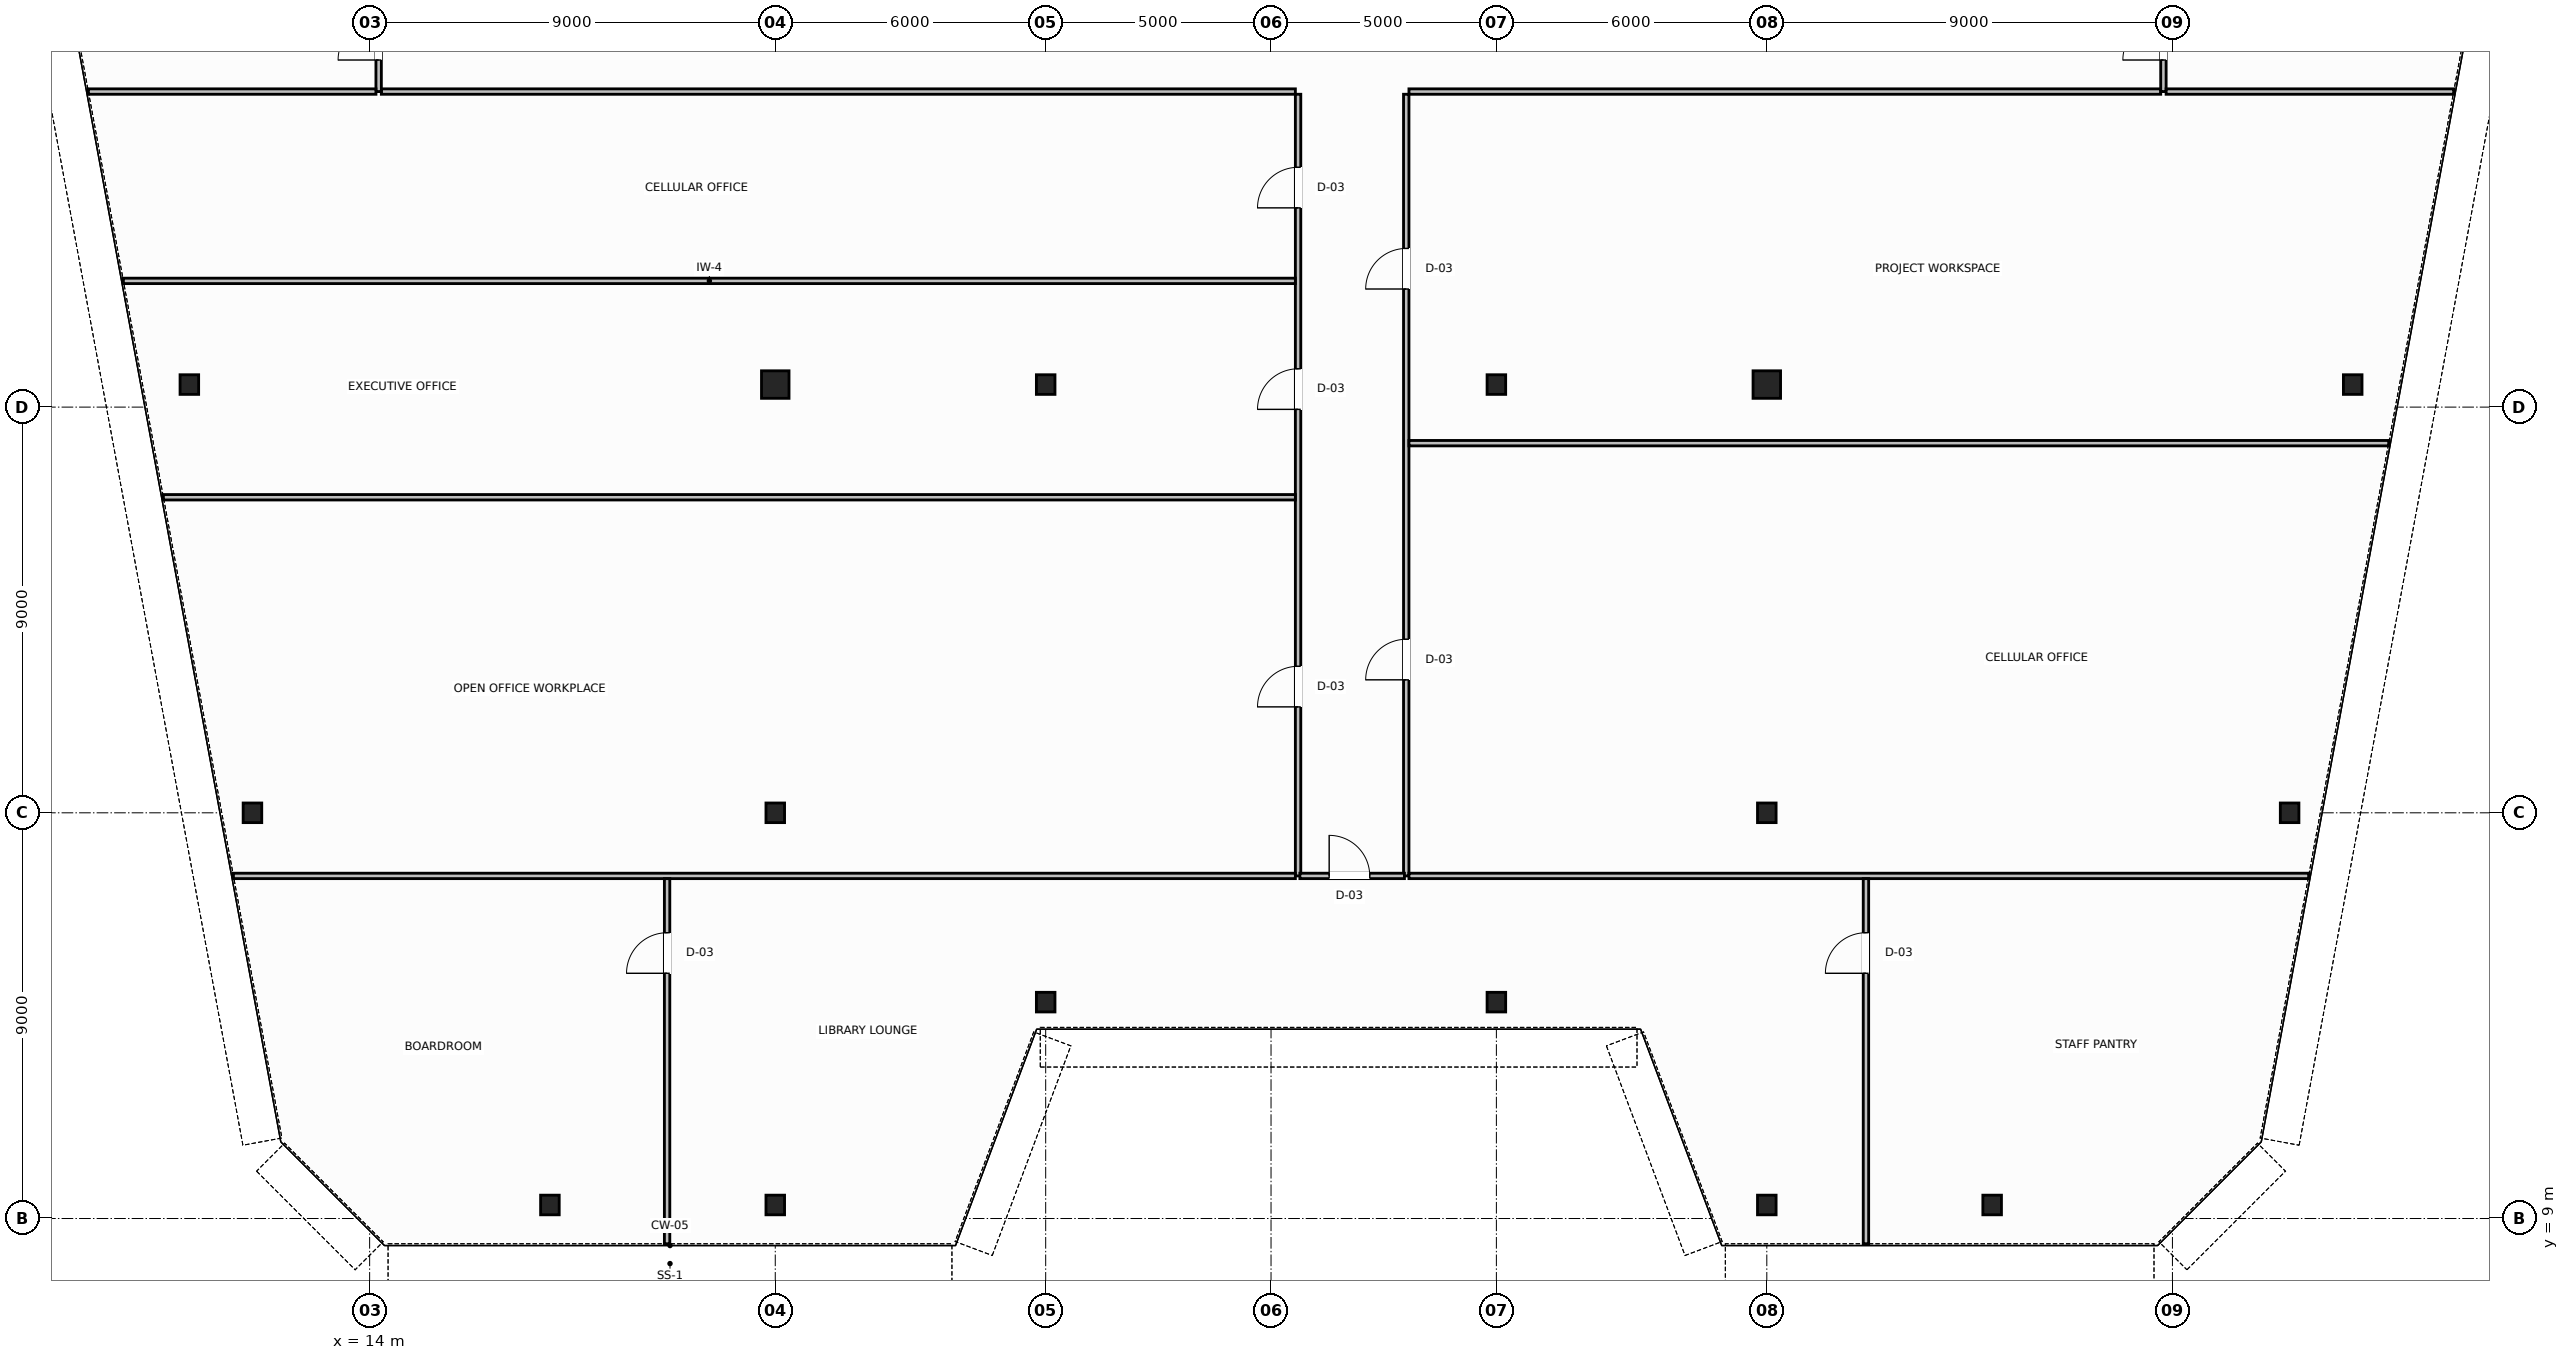
"""IFC4 building model, lengths in metres.
Left out: names, types, materials, properties, quantities, classifications, styles, units other than length and angle.
Written with IfcOpenShell. Run it as: python <this file> out.ifc"""

import sys

from ifc_helpers import new_model, si_unit, direction, frame, frame_2d, origin, origin_2d, place, context, subcontext, project, spatial, rectangle, hollow_circle, i_section, extrude, source, transform, mapped, element, fill, save


model = new_model("IFC4")
c1 = context("Model", 3, precision=1e-05, world=origin(), true_north=direction((0.0, 1.0)))
c2 = subcontext(c1, "Body", "Model", "MODEL_VIEW")
j1 = project(units=[si_unit("LENGTHUNIT", "METRE"), si_unit("PLANEANGLEUNIT", "RADIAN")], contexts=[c1])
p1 = place(None, origin())
s1 = spatial("IfcSite", under=j1, at=p1, CompositionType="ELEMENT")
p2 = place(p1, origin())
s2 = spatial("IfcBuilding", under=s1, at=p2, CompositionType="ELEMENT")
p3 = place(p2, frame((0.0, 0.0, 230.8)))
s3 = spatial("IfcBuildingStorey", under=s2, at=p3, CompositionType="ELEMENT", Elevation=230.8)
m1 = source(origin(), c2, "Body", "SweptSolid", [
    extrude(i_section(OverallWidth=0.412, OverallDepth=0.435, WebThickness=0.036, FlangeThickness=0.05, FilletRadius=0.015, at=origin_2d()), origin(), (0.0, 0.0, 1.0), 3.8),
])
for number, where, z_axis, x_axis in (
    (1, (10.0, 27.5, 0.0), (0.0, 0.0, 1.0), (1.0, 0.0, 0.0)),
    (2, (11.4, 18.0, 0.0), (0.0, 0.0, 1.0), (1.0, 0.0, 0.0)),
    (3, (58.0, 27.5, 0.0), (0.0, 0.0, 1.0), (1.0, 0.0, 0.0)),
    (4, (56.6, 18.0, 0.0), (0.0, 0.0, 1.0), (1.0, 0.0, 0.0)),
):
    element("IfcColumn", number, at=place(p3, frame(where, z_axis=z_axis, x_axis=x_axis)), inside=s3, PredefinedType="COLUMN", context=c2, shape_type="MappedRepresentation", body=[
        mapped(m1, transform((0.0, 0.0, 0.0), scale=1.0)),
    ])
m2 = source(origin(), c2, "Body", "SweptSolid", [
    extrude(hollow_circle(Radius=0.305, WallThickness=0.03, at=origin_2d()), origin(), (0.0, 0.0, 1.0), 3.8),
])
p4 = place(p3, frame((23.0, 27.5, 0.0), z_axis=(0.0, 0.0, 1.0), x_axis=(1.0, 0.0, 0.0)))
e5 = element("IfcColumn", 5, at=p4, inside=s3, PredefinedType="COLUMN", context=c2, shape_type="MappedRepresentation", body=[
    mapped(m2, transform((0.0, 0.0, 0.0), scale=1.0)),
])
m3 = source(origin(), c2, "Body", "SweptSolid", [
    extrude(i_section(OverallWidth=0.412, OverallDepth=0.435, WebThickness=0.036, FlangeThickness=0.05, FilletRadius=0.015, at=origin_2d()), origin(), (0.0, 0.0, 1.0), 3.8),
])
for number, where, z_axis, x_axis in (
    (6, (29.0, 27.5, 0.0), (0.0, 0.0, 1.0), (1.0, 0.0, 0.0)),
    (7, (39.0, 27.5, 0.0), (0.0, 0.0, 1.0), (1.0, 0.0, 0.0)),
):
    element("IfcColumn", number, at=place(p3, frame(where, z_axis=z_axis, x_axis=x_axis)), inside=s3, PredefinedType="COLUMN", context=c2, shape_type="MappedRepresentation", body=[
        mapped(m3, transform((0.0, 0.0, 0.0), scale=1.0)),
    ])
p5 = place(p3, frame((45.0, 27.5, 0.0), z_axis=(0.0, 0.0, 1.0), x_axis=(1.0, 0.0, 0.0)))
e8 = element("IfcColumn", 8, at=p5, inside=s3, PredefinedType="COLUMN", context=c2, shape_type="MappedRepresentation", body=[
    mapped(m2, transform((0.0, 0.0, 0.0), scale=1.0)),
])
for number, where, z_axis, x_axis in (
    (9, (23.0, 18.0, 0.0), (0.0, 0.0, 1.0), (1.0, 0.0, 0.0)),
    (10, (45.0, 18.0, 0.0), (0.0, 0.0, 1.0), (1.0, 0.0, 0.0)),
    (11, (18.0, 9.3, 0.0), (0.0, 0.0, 1.0), (1.0, 0.0, 0.0)),
    (12, (23.0, 9.3, 0.0), (0.0, 0.0, 1.0), (1.0, 0.0, 0.0)),
    (13, (29.0, 13.8, 0.0), (0.0, 0.0, 1.0), (1.0, 0.0, 0.0)),
    (14, (39.0, 13.8, 0.0), (0.0, 0.0, 1.0), (1.0, 0.0, 0.0)),
    (15, (45.0, 9.3, 0.0), (0.0, 0.0, 1.0), (1.0, 0.0, 0.0)),
    (16, (50.0, 9.3, 0.0), (0.0, 0.0, 1.0), (1.0, 0.0, 0.0)),
):
    element("IfcColumn", number, at=place(p3, frame(where, z_axis=z_axis, x_axis=x_axis)), inside=s3, PredefinedType="COLUMN", context=c2, shape_type="MappedRepresentation", body=[
        mapped(m3, transform((0.0, 0.0, 0.0), scale=1.0)),
    ])
p6 = place(p3, frame((14.26, 34.0, 0.0), z_axis=(0.0, 0.0, 1.0), x_axis=(1.0, 0.0, 0.0)))
e17 = element("IfcWall", 17, at=p6, inside=s3, PredefinedType="PARTITIONING", context=c2, shape_type="SweptSolid", body=[
    extrude(rectangle(XDim=20.28, YDim=0.12, at=frame_2d((10.14, 0.0))), origin(), (0.0, 0.0, 1.0), 3.58),
])
p7 = place(p3, frame((37.06, 34.0, 0.0), z_axis=(0.0, 0.0, 1.0), x_axis=(1.0, 0.0, 0.0)))
e18 = element("IfcWall", 18, at=p7, inside=s3, PredefinedType="PARTITIONING", context=c2, shape_type="SweptSolid", body=[
    extrude(rectangle(XDim=16.68, YDim=0.12, at=frame_2d((8.34, 0.0))), origin(), (0.0, 0.0, 1.0), 3.58),
])
p8 = place(p3, frame((14.2, 34.0, 0.0), z_axis=(0.0, 0.0, 1.0), x_axis=(0.0, 1.0, 0.0)))
e19 = element("IfcWall", 19, at=p8, inside=s3, PredefinedType="PARTITIONING", context=c2, shape_type="SweptSolid", body=[
    extrude(rectangle(XDim=2.44, YDim=0.12, at=frame_2d((1.22, 0.0))), origin(), (0.0, 0.0, 1.0), 3.58),
])
p9 = place(p8, frame((0.7, 0.0, 0.0)))
e20 = element("IfcOpeningElement", 20, at=p9, cuts=e19, PredefinedType="OPENING", context=c2, shape_type="SweptSolid", body=[
    extrude(rectangle(XDim=0.9, YDim=2.15, at=frame_2d((0.45, 1.075))), frame((0.0, 0.07, 0.0), z_axis=(0.0, -1.0, 0.0), x_axis=(1.0, 0.0, 0.0)), (0.0, 0.0, 1.0), 0.14),
])
p10 = place(p3, frame((53.8, 34.0, 0.0), z_axis=(0.0, 0.0, 1.0), x_axis=(0.0, 1.0, 0.0)))
e21 = element("IfcWall", 21, at=p10, inside=s3, PredefinedType="PARTITIONING", context=c2, shape_type="SweptSolid", body=[
    extrude(rectangle(XDim=2.44, YDim=0.12, at=frame_2d((1.22, 0.0))), origin(), (0.0, 0.0, 1.0), 3.58),
])
p11 = place(p10, frame((0.7, 0.0, 0.0)))
e22 = element("IfcOpeningElement", 22, at=p11, cuts=e21, PredefinedType="OPENING", context=c2, shape_type="SweptSolid", body=[
    extrude(rectangle(XDim=0.9, YDim=2.15, at=frame_2d((0.45, 1.075))), frame((0.0, 0.07, 0.0), z_axis=(0.0, -1.0, 0.0), x_axis=(1.0, 0.0, 0.0)), (0.0, 0.0, 1.0), 0.14),
])
p12 = place(p3, frame((34.6, 16.6, 0.0), z_axis=(0.0, 0.0, 1.0), x_axis=(0.0, 1.0, 0.0)))
e23 = element("IfcWall", 23, at=p12, inside=s3, PredefinedType="PARTITIONING", context=c2, shape_type="SweptSolid", body=[
    extrude(rectangle(XDim=17.34, YDim=0.12, at=frame_2d((8.67, 0.0))), origin(), (0.0, 0.0, 1.0), 3.58),
])
p13 = place(p12, frame((3.75, 0.0, 0.0)))
e24 = element("IfcOpeningElement", 24, at=p13, cuts=e23, PredefinedType="OPENING", context=c2, shape_type="SweptSolid", body=[
    extrude(rectangle(XDim=0.9, YDim=2.15, at=frame_2d((0.45, 1.075))), frame((0.0, 0.07, 0.0), z_axis=(0.0, -1.0, 0.0), x_axis=(1.0, 0.0, 0.0)), (0.0, 0.0, 1.0), 0.14),
])
p14 = place(p12, frame((10.35, 0.0, 0.0)))
e25 = element("IfcOpeningElement", 25, at=p14, cuts=e23, PredefinedType="OPENING", context=c2, shape_type="SweptSolid", body=[
    extrude(rectangle(XDim=0.9, YDim=2.15, at=frame_2d((0.45, 1.075))), frame((0.0, 0.07, 0.0), z_axis=(0.0, -1.0, 0.0), x_axis=(1.0, 0.0, 0.0)), (0.0, 0.0, 1.0), 0.14),
])
p15 = place(p12, frame((14.82, 0.0, 0.0)))
e26 = element("IfcOpeningElement", 26, at=p15, cuts=e23, PredefinedType="OPENING", context=c2, shape_type="SweptSolid", body=[
    extrude(rectangle(XDim=0.9, YDim=2.15, at=frame_2d((0.45, 1.075))), frame((0.0, 0.07, 0.0), z_axis=(0.0, -1.0, 0.0), x_axis=(1.0, 0.0, 0.0)), (0.0, 0.0, 1.0), 0.14),
])
p16 = place(p3, frame((37.0, 16.6, 0.0), z_axis=(0.0, 0.0, 1.0), x_axis=(0.0, 1.0, 0.0)))
e27 = element("IfcWall", 27, at=p16, inside=s3, PredefinedType="PARTITIONING", context=c2, shape_type="SweptSolid", body=[
    extrude(rectangle(XDim=17.34, YDim=0.12, at=frame_2d((8.67, 0.0))), origin(), (0.0, 0.0, 1.0), 3.58),
])
p17 = place(p16, frame((4.35, 0.0, 0.0)))
e28 = element("IfcOpeningElement", 28, at=p17, cuts=e27, PredefinedType="OPENING", context=c2, shape_type="SweptSolid", body=[
    extrude(rectangle(XDim=0.9, YDim=2.15, at=frame_2d((0.45, 1.075))), frame((0.0, 0.07, 0.0), z_axis=(0.0, -1.0, 0.0), x_axis=(1.0, 0.0, 0.0)), (0.0, 0.0, 1.0), 0.14),
])
p18 = place(p16, frame((13.02, 0.0, 0.0)))
e29 = element("IfcOpeningElement", 29, at=p18, cuts=e27, PredefinedType="OPENING", context=c2, shape_type="SweptSolid", body=[
    extrude(rectangle(XDim=0.9, YDim=2.15, at=frame_2d((0.45, 1.075))), frame((0.0, 0.07, 0.0), z_axis=(0.0, -1.0, 0.0), x_axis=(1.0, 0.0, 0.0)), (0.0, 0.0, 1.0), 0.14),
])
p19 = place(p3, frame((34.64, 16.6, 0.0), z_axis=(0.0, 0.0, 1.0), x_axis=(1.0, 0.0, 0.0)))
e30 = element("IfcWall", 30, at=p19, inside=s3, PredefinedType="PARTITIONING", context=c2, shape_type="SweptSolid", body=[
    extrude(rectangle(XDim=2.32, YDim=0.12, at=frame_2d((1.16, 0.0))), origin(), (0.0, 0.0, 1.0), 3.58),
])
p20 = place(p19, frame((0.65, 0.0, 0.0)))
e31 = element("IfcOpeningElement", 31, at=p20, cuts=e30, PredefinedType="OPENING", context=c2, shape_type="SweptSolid", body=[
    extrude(rectangle(XDim=0.9, YDim=2.15, at=frame_2d((0.45, 1.075))), frame((0.0, 0.07, 0.0), z_axis=(0.0, -1.0, 0.0), x_axis=(1.0, 0.0, 0.0)), (0.0, 0.0, 1.0), 0.14),
])
for number, where, z_axis, x_axis in (
    (32, (7.759, 34.0, 0.0), (0.0, 0.0, 1.0), (1.0, 0.0, 0.0)),
    (33, (53.86, 34.0, 0.0), (0.0, 0.0, 1.0), (1.0, 0.0, 0.0)),
):
    element("IfcWall", number, at=place(p3, frame(where, z_axis=z_axis, x_axis=x_axis)), inside=s3, PredefinedType="PARTITIONING", context=c2, shape_type="SweptSolid", body=[
        extrude(rectangle(XDim=6.381, YDim=0.12, at=frame_2d((3.19, 0.0))), origin(), (0.0, 0.0, 1.0), 3.58),
    ])
p21 = place(p3, frame((9.424, 25.0, 0.0), z_axis=(0.0, 0.0, 1.0), x_axis=(1.0, 0.0, 0.0)))
e34 = element("IfcWall", 34, at=p21, inside=s3, PredefinedType="PARTITIONING", context=c2, shape_type="SweptSolid", body=[
    extrude(rectangle(XDim=25.116, YDim=0.12, at=frame_2d((12.558, 0.0))), origin(), (0.0, 0.0, 1.0), 3.58),
])
p22 = place(p3, frame((8.536, 29.8, 0.0), z_axis=(0.0, 0.0, 1.0), x_axis=(1.0, 0.0, 0.0)))
e35 = element("IfcWall", 35, at=p22, inside=s3, PredefinedType="PARTITIONING", context=c2, shape_type="SweptSolid", body=[
    extrude(rectangle(XDim=26.004, YDim=0.12, at=frame_2d((13.002, 0.0))), origin(), (0.0, 0.0, 1.0), 3.58),
])
p23 = place(p3, frame((37.06, 26.2, 0.0), z_axis=(0.0, 0.0, 1.0), x_axis=(1.0, 0.0, 0.0)))
e36 = element("IfcWall", 36, at=p23, inside=s3, PredefinedType="PARTITIONING", context=c2, shape_type="SweptSolid", body=[
    extrude(rectangle(XDim=21.738, YDim=0.12, at=frame_2d((10.869, 0.0))), origin(), (0.0, 0.0, 1.0), 3.58),
])
p24 = place(p3, frame((10.978, 16.6, 0.0), z_axis=(0.0, 0.0, 1.0), x_axis=(1.0, 0.0, 0.0)))
e37 = element("IfcWall", 37, at=p24, inside=s3, PredefinedType="PARTITIONING", context=c2, shape_type="SweptSolid", body=[
    extrude(rectangle(XDim=23.562, YDim=0.12, at=frame_2d((11.781, 0.0))), origin(), (0.0, 0.0, 1.0), 3.58),
])
p25 = place(p3, frame((37.06, 16.6, 0.0), z_axis=(0.0, 0.0, 1.0), x_axis=(1.0, 0.0, 0.0)))
e38 = element("IfcWall", 38, at=p25, inside=s3, PredefinedType="PARTITIONING", context=c2, shape_type="SweptSolid", body=[
    extrude(rectangle(XDim=19.962, YDim=0.12, at=frame_2d((9.981, 0.0))), origin(), (0.0, 0.0, 1.0), 3.58),
])
p26 = place(p3, frame((20.6, 8.44, 0.0), z_axis=(0.0, 0.0, 1.0), x_axis=(0.0, 1.0, 0.0)))
e39 = element("IfcWall", 39, at=p26, inside=s3, PredefinedType="PARTITIONING", context=c2, shape_type="SweptSolid", body=[
    extrude(rectangle(XDim=8.1, YDim=0.12, at=frame_2d((4.05, 0.0))), origin(), (0.0, 0.0, 1.0), 3.58),
])
p27 = place(p26, frame((6.0, 0.0, 0.0)))
e40 = element("IfcOpeningElement", 40, at=p27, cuts=e39, PredefinedType="OPENING", context=c2, shape_type="SweptSolid", body=[
    extrude(rectangle(XDim=0.9, YDim=2.15, at=frame_2d((0.45, 1.075))), frame((0.0, 0.07, 0.0), z_axis=(0.0, -1.0, 0.0), x_axis=(1.0, 0.0, 0.0)), (0.0, 0.0, 1.0), 0.14),
])
p28 = place(p3, frame((47.2, 8.44, 0.0), z_axis=(0.0, 0.0, 1.0), x_axis=(0.0, 1.0, 0.0)))
e41 = element("IfcWall", 41, at=p28, inside=s3, PredefinedType="PARTITIONING", context=c2, shape_type="SweptSolid", body=[
    extrude(rectangle(XDim=8.1, YDim=0.12, at=frame_2d((4.05, 0.0))), origin(), (0.0, 0.0, 1.0), 3.58),
])
p29 = place(p28, frame((6.0, 0.0, 0.0)))
e42 = element("IfcOpeningElement", 42, at=p29, cuts=e41, PredefinedType="OPENING", context=c2, shape_type="SweptSolid", body=[
    extrude(rectangle(XDim=0.9, YDim=2.15, at=frame_2d((0.45, 1.075))), frame((0.0, 0.07, 0.0), z_axis=(0.0, -1.0, 0.0), x_axis=(1.0, 0.0, 0.0)), (0.0, 0.0, 1.0), 0.14),
])
m4 = source(origin(), c2, "Body", "SweptSolid", [
    extrude(rectangle(XDim=0.9, YDim=2.15, at=frame_2d((0.45, 1.075))), frame((0.0, 0.025, 0.0), z_axis=(0.0, -1.0, 0.0), x_axis=(1.0, 0.0, 0.0)), (0.0, 0.0, 1.0), 0.05),
])
p30 = place(p9, origin())
e43 = element("IfcDoor", 43, at=p30, inside=s3, OperationType="SINGLE_SWING_LEFT", PredefinedType="DOOR", context=c2, shape_type="MappedRepresentation", body=[
    mapped(m4, transform((0.0, 0.0, 0.0), scale=1.0)),
])
fill(e20, e43)
p31 = place(p11, origin())
e44 = element("IfcDoor", 44, at=p31, inside=s3, OperationType="SINGLE_SWING_RIGHT", PredefinedType="DOOR", context=c2, shape_type="MappedRepresentation", body=[
    mapped(m4, transform((0.0, 0.0, 0.0), scale=1.0)),
])
fill(e22, e44)
p32 = place(p13, origin())
e45 = element("IfcDoor", 45, at=p32, inside=s3, OperationType="SINGLE_SWING_LEFT", PredefinedType="DOOR", context=c2, shape_type="MappedRepresentation", body=[
    mapped(m4, transform((0.0, 0.0, 0.0), scale=1.0)),
])
fill(e24, e45)
p33 = place(p14, origin())
e46 = element("IfcDoor", 46, at=p33, inside=s3, OperationType="SINGLE_SWING_RIGHT", PredefinedType="DOOR", context=c2, shape_type="MappedRepresentation", body=[
    mapped(m4, transform((0.0, 0.0, 0.0), scale=1.0)),
])
fill(e25, e46)
p34 = place(p15, origin())
e47 = element("IfcDoor", 47, at=p34, inside=s3, OperationType="SINGLE_SWING_LEFT", PredefinedType="DOOR", context=c2, shape_type="MappedRepresentation", body=[
    mapped(m4, transform((0.0, 0.0, 0.0), scale=1.0)),
])
fill(e26, e47)
p35 = place(p17, origin())
e48 = element("IfcDoor", 48, at=p35, inside=s3, OperationType="SINGLE_SWING_RIGHT", PredefinedType="DOOR", context=c2, shape_type="MappedRepresentation", body=[
    mapped(m4, transform((0.0, 0.0, 0.0), scale=1.0)),
])
fill(e28, e48)
p36 = place(p18, origin())
e49 = element("IfcDoor", 49, at=p36, inside=s3, OperationType="SINGLE_SWING_LEFT", PredefinedType="DOOR", context=c2, shape_type="MappedRepresentation", body=[
    mapped(m4, transform((0.0, 0.0, 0.0), scale=1.0)),
])
fill(e29, e49)
p37 = place(p27, origin())
e50 = element("IfcDoor", 50, at=p37, inside=s3, OperationType="SINGLE_SWING_RIGHT", PredefinedType="DOOR", context=c2, shape_type="MappedRepresentation", body=[
    mapped(m4, transform((0.0, 0.0, 0.0), scale=1.0)),
])
fill(e40, e50)
p38 = place(p20, origin())
e51 = element("IfcDoor", 51, at=p38, inside=s3, OperationType="SINGLE_SWING_LEFT", PredefinedType="DOOR", context=c2, shape_type="MappedRepresentation", body=[
    mapped(m4, transform((0.0, 0.0, 0.0), scale=1.0)),
])
fill(e31, e51)
p39 = place(p29, origin())
e52 = element("IfcDoor", 52, at=p39, inside=s3, OperationType="SINGLE_SWING_LEFT", PredefinedType="DOOR", context=c2, shape_type="MappedRepresentation", body=[
    mapped(m4, transform((0.0, 0.0, 0.0), scale=1.0)),
])
fill(e42, e52)
save(model, sys.argv[1])
